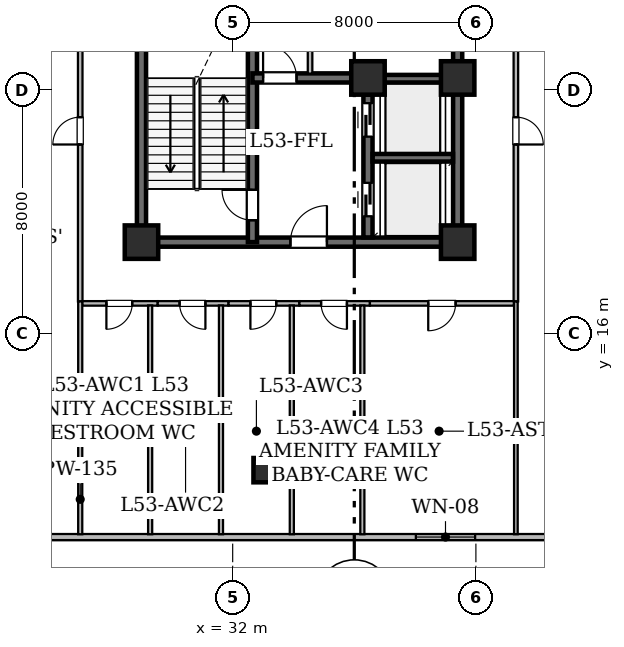
"""IFC4 building model, lengths in metres.
Left out: names, types, materials, properties, quantities, classifications, styles, units other than length and angle.
Written with IfcOpenShell. Run it as: python <this file> out.ifc"""

import sys

from ifc_helpers import new_model, si_unit, direction, frame, frame_2d, origin, origin_2d, place, context, subcontext, project, spatial, rectangle, hollow_rectangle, extrude, element, fill, save


model = new_model("IFC4")
c1 = context("Model", 3, precision=1e-05, world=origin(), true_north=direction((0.0, 1.0)))
c2 = subcontext(c1, "Body", "Model", "MODEL_VIEW")
j1 = project(units=[si_unit("LENGTHUNIT", "METRE"), si_unit("PLANEANGLEUNIT", "RADIAN")], contexts=[c1])
p1 = place(None, origin())
s1 = spatial("IfcSite", under=j1, at=p1, CompositionType="ELEMENT")
p2 = place(p1, origin())
s2 = spatial("IfcBuilding", under=s1, at=p2, CompositionType="ELEMENT")
p3 = place(p2, frame((0.0, 0.0, 207.0)))
s3 = spatial("IfcBuildingStorey", under=s2, at=p3, CompositionType="ELEMENT", Elevation=207.0)
for number, where, z_axis, x_axis in (
    (1, (29.0, 19.0, 0.0), (0.0, 0.0, 1.0), (1.0, 0.0, 0.0)),
    (2, (39.4, 19.0, 0.0), (0.0, 0.0, 1.0), (1.0, 0.0, 0.0)),
    (3, (36.45, 24.4, 0.0), (0.0, 0.0, 1.0), (1.0, 0.0, 0.0)),
    (4, (39.4, 24.4, 0.0), (0.0, 0.0, 1.0), (1.0, 0.0, 0.0)),
):
    element("IfcColumn", number, at=place(p3, frame(where, z_axis=z_axis, x_axis=x_axis)), inside=s3, PredefinedType="COLUMN", context=c2, shape_type="SweptSolid", body=[
        extrude(hollow_rectangle(XDim=1.1, YDim=1.1, WallThickness=0.055, at=origin_2d()), origin(), (0.0, 0.0, 1.0), 4.8),
    ])
p4 = place(p3, frame((33.083, 11.5, 0.0), z_axis=(0.0, 0.0, 1.0), x_axis=(1.0, 0.0, 0.0)))
e5 = element("IfcColumn", 5, at=p4, inside=s3, PredefinedType="COLUMN", context=c2, shape_type="SweptSolid", body=[
    extrude(hollow_rectangle(XDim=0.8, YDim=0.8, WallThickness=0.04, at=origin_2d()), origin(), (0.0, 0.0, 1.0), 4.8),
])
p5 = place(p3, frame((58.896, 9.3, 0.0), z_axis=(0.0, 0.0, 1.0), x_axis=(-1.0, 0.0, 0.0)))
e6 = element("IfcWall", 6, at=p5, inside=s3, PredefinedType="STANDARD", context=c2, shape_type="SweptSolid", body=[
    extrude(rectangle(XDim=39.793, YDim=0.2, at=frame_2d((19.896, 0.0))), origin(), (0.0, 0.0, 1.0), 4.48),
])
p6 = place(p5, frame((18.921, 0.0, 0.9)))
e7 = element("IfcOpeningElement", 7, at=p6, cuts=e6, PredefinedType="OPENING", context=c2, shape_type="SweptSolid", body=[
    extrude(rectangle(XDim=1.95, YDim=1.65, at=frame_2d((0.975, 0.825))), frame((0.0, 0.11, 0.0), z_axis=(0.0, -1.0, 0.0), x_axis=(1.0, 0.0, 0.0)), (0.0, 0.0, 1.0), 0.22),
])
p7 = place(p3, frame((29.0, 19.0, 0.0), z_axis=(0.0, 0.0, 1.0), x_axis=(0.0, 1.0, 0.0)))
e8 = element("IfcWall", 8, at=p7, inside=s3, PredefinedType="SHEAR", context=c2, shape_type="SweptSolid", body=[
    extrude(rectangle(XDim=9.0, YDim=0.3, at=frame_2d((4.5, 0.0))), origin(), (0.0, 0.0, 1.0), 4.48),
])
p8 = place(p3, frame((29.0, 19.0, 0.0), z_axis=(0.0, 0.0, 1.0), x_axis=(1.0, 0.0, 0.0)))
e9 = element("IfcWall", 9, at=p8, inside=s3, PredefinedType="SHEAR", context=c2, shape_type="SweptSolid", body=[
    extrude(rectangle(XDim=10.4, YDim=0.3, at=frame_2d((5.2, 0.0))), origin(), (0.0, 0.0, 1.0), 4.48),
])
p9 = place(p8, frame((4.9, 0.0, 0.0)))
e10 = element("IfcOpeningElement", 10, at=p9, cuts=e9, PredefinedType="OPENING", context=c2, shape_type="SweptSolid", body=[
    extrude(rectangle(XDim=1.2, YDim=2.15, at=frame_2d((0.6, 1.075))), frame((0.0, 0.16, 0.0), z_axis=(0.0, -1.0, 0.0), x_axis=(1.0, 0.0, 0.0)), (0.0, 0.0, 1.0), 0.32),
])
p10 = place(p3, frame((39.4, 19.0, 0.0), z_axis=(0.0, 0.0, 1.0), x_axis=(0.0, 1.0, 0.0)))
e11 = element("IfcWall", 11, at=p10, inside=s3, PredefinedType="SHEAR", context=c2, shape_type="SweptSolid", body=[
    extrude(rectangle(XDim=5.4, YDim=0.3, at=frame_2d((2.7, 0.0))), origin(), (0.0, 0.0, 1.0), 4.48),
])
p11 = place(p3, frame((39.4, 24.4, 0.0), z_axis=(0.0, 0.0, 1.0), x_axis=(0.0, 1.0, 0.0)))
e12 = element("IfcWall", 12, at=p11, inside=s3, PredefinedType="SHEAR", context=c2, shape_type="SweptSolid", body=[
    extrude(rectangle(XDim=12.6, YDim=0.3, at=frame_2d((6.3, 0.0))), origin(), (0.0, 0.0, 1.0), 4.48),
])
p12 = place(p3, frame((32.65, 19.0, 0.0), z_axis=(0.0, 0.0, 1.0), x_axis=(0.0, 1.0, 0.0)))
e13 = element("IfcWall", 13, at=p12, inside=s3, PredefinedType="SHEAR", context=c2, shape_type="SweptSolid", body=[
    extrude(rectangle(XDim=9.0, YDim=0.3, at=frame_2d((4.5, 0.0))), origin(), (0.0, 0.0, 1.0), 4.48),
])
p13 = place(p12, frame((0.72, 0.0, 0.0)))
e14 = element("IfcOpeningElement", 14, at=p13, cuts=e13, PredefinedType="OPENING", context=c2, shape_type="SweptSolid", body=[
    extrude(rectangle(XDim=1.0, YDim=2.15, at=frame_2d((0.5, 1.075))), frame((0.0, 0.16, 0.0), z_axis=(0.0, -1.0, 0.0), x_axis=(1.0, 0.0, 0.0)), (0.0, 0.0, 1.0), 0.32),
])
p14 = place(p3, frame((32.65, 24.4, 0.0), z_axis=(0.0, 0.0, 1.0), x_axis=(1.0, 0.0, 0.0)))
e15 = element("IfcWall", 15, at=p14, inside=s3, PredefinedType="SHEAR", context=c2, shape_type="SweptSolid", body=[
    extrude(rectangle(XDim=3.8, YDim=0.3, at=frame_2d((1.9, 0.0))), origin(), (0.0, 0.0, 1.0), 4.48),
])
p15 = place(p14, frame((0.35, 0.0, 0.0)))
e16 = element("IfcOpeningElement", 16, at=p15, cuts=e15, PredefinedType="OPENING", context=c2, shape_type="SweptSolid", body=[
    extrude(rectangle(XDim=1.1, YDim=2.15, at=frame_2d((0.55, 1.075))), frame((0.0, 0.16, 0.0), z_axis=(0.0, -1.0, 0.0), x_axis=(1.0, 0.0, 0.0)), (0.0, 0.0, 1.0), 0.32),
])
p16 = place(p3, frame((36.45, 19.154, 0.0), z_axis=(0.0, 0.0, 1.0), x_axis=(0.0, 1.0, 0.0)))
e17 = element("IfcWall", 17, at=p16, inside=s3, PredefinedType="SHEAR", context=c2, shape_type="SweptSolid", body=[
    extrude(rectangle(XDim=4.696, YDim=0.3, at=frame_2d((2.348, 0.0))), origin(), (0.0, 0.0, 1.0), 4.48),
])
p17 = place(p16, frame((0.696, 0.0, 0.0)))
e18 = element("IfcOpeningElement", 18, at=p17, cuts=e17, PredefinedType="OPENING", context=c2, shape_type="SweptSolid", body=[
    extrude(rectangle(XDim=1.1, YDim=2.15, at=frame_2d((0.55, 1.075))), frame((0.0, 0.16, 0.0), z_axis=(0.0, -1.0, 0.0), x_axis=(1.0, 0.0, 0.0)), (0.0, 0.0, 1.0), 0.32),
])
p18 = place(p16, frame((3.316, 0.0, 0.0)))
e19 = element("IfcOpeningElement", 19, at=p18, cuts=e17, PredefinedType="OPENING", context=c2, shape_type="SweptSolid", body=[
    extrude(rectangle(XDim=1.1, YDim=2.15, at=frame_2d((0.55, 1.075))), frame((0.0, 0.16, 0.0), z_axis=(0.0, -1.0, 0.0), x_axis=(1.0, 0.0, 0.0)), (0.0, 0.0, 1.0), 0.32),
])
for number, where, z_axis, x_axis in (
    (20, (36.604, 21.775, 0.0), (0.0, 0.0, 1.0), (1.0, 0.0, 0.0)),
    (21, (36.604, 24.375, 0.0), (0.0, 0.0, 1.0), (1.0, 0.0, 0.0)),
):
    element("IfcWall", number, at=place(p3, frame(where, z_axis=z_axis, x_axis=x_axis)), inside=s3, PredefinedType="SHEAR", context=c2, shape_type="SweptSolid", body=[
        extrude(rectangle(XDim=2.642, YDim=0.25, at=frame_2d((1.321, 0.0))), origin(), (0.0, 0.0, 1.0), 4.48),
    ])
p19 = place(p3, frame((34.545, 28.136, 0.0), z_axis=(0.0, 0.0, 1.0), x_axis=(0.0, -1.0, 0.0)))
e22 = element("IfcWall", 22, at=p19, inside=s3, PredefinedType="STANDARD", context=c2, shape_type="SweptSolid", body=[
    extrude(rectangle(XDim=3.592, YDim=0.15, at=frame_2d((1.796, 0.0))), origin(), (0.0, 0.0, 1.0), 4.48),
])
p20 = place(p19, frame((1.346, 0.0, 0.0)))
e23 = element("IfcOpeningElement", 23, at=p20, cuts=e22, PredefinedType="OPENING", context=c2, shape_type="SweptSolid", body=[
    extrude(rectangle(XDim=0.9, YDim=2.1, at=frame_2d((0.45, 1.05))), frame((0.0, 0.085, 0.0), z_axis=(0.0, -1.0, 0.0), x_axis=(1.0, 0.0, 0.0)), (0.0, 0.0, 1.0), 0.17),
])
p21 = place(p3, frame((41.315, 28.314, 0.0), z_axis=(0.0, 0.0, 1.0), x_axis=(0.0, -1.0, 0.0)))
e24 = element("IfcWall", 24, at=p21, inside=s3, PredefinedType="STANDARD", context=c2, shape_type="SweptSolid", body=[
    extrude(rectangle(XDim=11.264, YDim=0.15, at=frame_2d((5.632, 0.0))), origin(), (0.0, 0.0, 1.0), 3.775),
])
p22 = place(p21, frame((5.203, 0.0, 0.0)))
e25 = element("IfcOpeningElement", 25, at=p22, cuts=e24, PredefinedType="OPENING", context=c2, shape_type="SweptSolid", body=[
    extrude(rectangle(XDim=0.9, YDim=2.1, at=frame_2d((0.45, 1.05))), frame((0.0, 0.085, 0.0), z_axis=(0.0, -1.0, 0.0), x_axis=(1.0, 0.0, 0.0)), (0.0, 0.0, 1.0), 0.17),
])
p23 = place(p3, frame((26.985, 17.05, 0.0), z_axis=(0.0, 0.0, 1.0), x_axis=(0.0, 1.0, 0.0)))
e26 = element("IfcWall", 26, at=p23, inside=s3, PredefinedType="STANDARD", context=c2, shape_type="SweptSolid", body=[
    extrude(rectangle(XDim=11.264, YDim=0.15, at=frame_2d((5.632, 0.0))), origin(), (0.0, 0.0, 1.0), 3.775),
])
p24 = place(p23, frame((5.161, 0.0, 0.0)))
e27 = element("IfcOpeningElement", 27, at=p24, cuts=e26, PredefinedType="OPENING", context=c2, shape_type="SweptSolid", body=[
    extrude(rectangle(XDim=0.9, YDim=2.1, at=frame_2d((0.45, 1.05))), frame((0.0, 0.085, 0.0), z_axis=(0.0, -1.0, 0.0), x_axis=(1.0, 0.0, 0.0)), (0.0, 0.0, 1.0), 0.17),
])
p25 = place(p3, frame((29.534, 16.985, 0.0), z_axis=(0.0, 0.0, 1.0), x_axis=(-1.0, 0.0, 0.0)))
e28 = element("IfcWall", 28, at=p25, inside=s3, PredefinedType="STANDARD", context=c2, shape_type="SweptSolid", body=[
    extrude(rectangle(XDim=2.484, YDim=0.15, at=frame_2d((1.242, 0.0))), origin(), (0.0, 0.0, 1.0), 3.775),
])
p26 = place(p25, frame((0.838, 0.0, 0.0)))
e29 = element("IfcOpeningElement", 29, at=p26, cuts=e28, PredefinedType="OPENING", context=c2, shape_type="SweptSolid", body=[
    extrude(rectangle(XDim=0.85, YDim=2.1, at=frame_2d((0.425, 1.05))), frame((0.0, 0.085, 0.0), z_axis=(0.0, -1.0, 0.0), x_axis=(1.0, 0.0, 0.0)), (0.0, 0.0, 1.0), 0.17),
])
p27 = place(p3, frame((31.864, 16.985, 0.0), z_axis=(0.0, 0.0, 1.0), x_axis=(-1.0, 0.0, 0.0)))
e30 = element("IfcWall", 30, at=p27, inside=s3, PredefinedType="STANDARD", context=c2, shape_type="SweptSolid", body=[
    extrude(rectangle(XDim=2.33, YDim=0.15, at=frame_2d((1.165, 0.0))), origin(), (0.0, 0.0, 1.0), 3.775),
])
p28 = place(p27, frame((0.761, 0.0, 0.0)))
e31 = element("IfcOpeningElement", 31, at=p28, cuts=e30, PredefinedType="OPENING", context=c2, shape_type="SweptSolid", body=[
    extrude(rectangle(XDim=0.85, YDim=2.1, at=frame_2d((0.425, 1.05))), frame((0.0, 0.085, 0.0), z_axis=(0.0, -1.0, 0.0), x_axis=(1.0, 0.0, 0.0)), (0.0, 0.0, 1.0), 0.17),
])
p29 = place(p3, frame((34.194, 16.985, 0.0), z_axis=(0.0, 0.0, 1.0), x_axis=(-1.0, 0.0, 0.0)))
e32 = element("IfcWall", 32, at=p29, inside=s3, PredefinedType="STANDARD", context=c2, shape_type="SweptSolid", body=[
    extrude(rectangle(XDim=2.33, YDim=0.15, at=frame_2d((1.165, 0.0))), origin(), (0.0, 0.0, 1.0), 4.48),
])
p30 = place(p29, frame((0.761, 0.0, 0.0)))
e33 = element("IfcOpeningElement", 33, at=p30, cuts=e32, PredefinedType="OPENING", context=c2, shape_type="SweptSolid", body=[
    extrude(rectangle(XDim=0.85, YDim=2.1, at=frame_2d((0.425, 1.05))), frame((0.0, 0.085, 0.0), z_axis=(0.0, -1.0, 0.0), x_axis=(1.0, 0.0, 0.0)), (0.0, 0.0, 1.0), 0.17),
])
p31 = place(p3, frame((36.514, 16.985, 0.0), z_axis=(0.0, 0.0, 1.0), x_axis=(-1.0, 0.0, 0.0)))
e34 = element("IfcWall", 34, at=p31, inside=s3, PredefinedType="STANDARD", context=c2, shape_type="SweptSolid", body=[
    extrude(rectangle(XDim=2.32, YDim=0.15, at=frame_2d((1.16, 0.0))), origin(), (0.0, 0.0, 1.0), 4.48),
])
p32 = place(p31, frame((0.756, 0.0, 0.0)))
e35 = element("IfcOpeningElement", 35, at=p32, cuts=e34, PredefinedType="OPENING", context=c2, shape_type="SweptSolid", body=[
    extrude(rectangle(XDim=0.85, YDim=2.1, at=frame_2d((0.425, 1.05))), frame((0.0, 0.085, 0.0), z_axis=(0.0, -1.0, 0.0), x_axis=(1.0, 0.0, 0.0)), (0.0, 0.0, 1.0), 0.17),
])
p33 = place(p3, frame((41.25, 16.985, 0.0), z_axis=(0.0, 0.0, 1.0), x_axis=(-1.0, 0.0, 0.0)))
e36 = element("IfcWall", 36, at=p33, inside=s3, PredefinedType="STANDARD", context=c2, shape_type="SweptSolid", body=[
    extrude(rectangle(XDim=4.736, YDim=0.15, at=frame_2d((2.368, 0.0))), origin(), (0.0, 0.0, 1.0), 3.775),
])
p34 = place(p33, frame((1.918, 0.0, 0.0)))
e37 = element("IfcOpeningElement", 37, at=p34, cuts=e36, PredefinedType="OPENING", context=c2, shape_type="SweptSolid", body=[
    extrude(rectangle(XDim=0.9, YDim=2.1, at=frame_2d((0.45, 1.05))), frame((0.0, 0.085, 0.0), z_axis=(0.0, -1.0, 0.0), x_axis=(1.0, 0.0, 0.0)), (0.0, 0.0, 1.0), 0.17),
])
p35 = place(p3, frame((41.315, 9.392, 0.0), z_axis=(0.0, 0.0, 1.0), x_axis=(0.0, 1.0, 0.0)))
e38 = element("IfcWall", 38, at=p35, inside=s3, PredefinedType="PARTITIONING", context=c2, shape_type="SweptSolid", body=[
    extrude(rectangle(XDim=7.658, YDim=0.12, at=frame_2d((3.829, 0.0))), origin(), (0.0, 0.0, 1.0), 3.775),
])
p36 = place(p3, frame((26.985, 17.05, 0.0), z_axis=(0.0, 0.0, 1.0), x_axis=(0.0, -1.0, 0.0)))
e39 = element("IfcWall", 39, at=p36, inside=s3, PredefinedType="PARTITIONING", context=c2, shape_type="SweptSolid", body=[
    extrude(rectangle(XDim=7.658, YDim=0.135, at=frame_2d((3.829, 0.0))), origin(), (0.0, 0.0, 1.0), 3.775),
])
p37 = place(p3, frame((29.285, 16.918, 0.0), z_axis=(0.0, 0.0, 1.0), x_axis=(0.0, -1.0, 0.0)))
e40 = element("IfcWall", 40, at=p37, inside=s3, PredefinedType="PARTITIONING", context=c2, shape_type="SweptSolid", body=[
    extrude(rectangle(XDim=7.526, YDim=0.135, at=frame_2d((3.763, 0.0))), origin(), (0.0, 0.0, 1.0), 3.937),
])
p38 = place(p3, frame((31.615, 16.918, 0.0), z_axis=(0.0, 0.0, 1.0), x_axis=(0.0, -1.0, 0.0)))
e41 = element("IfcWall", 41, at=p38, inside=s3, PredefinedType="PARTITIONING", context=c2, shape_type="SweptSolid", body=[
    extrude(rectangle(XDim=7.526, YDim=0.135, at=frame_2d((3.763, 0.0))), origin(), (0.0, 0.0, 1.0), 3.775),
])
for number, where, z_axis, x_axis in (
    (42, (33.945, 16.918, 0.0), (0.0, 0.0, 1.0), (0.0, -1.0, 0.0)),
    (43, (36.265, 16.918, 0.0), (0.0, 0.0, 1.0), (0.0, -1.0, 0.0)),
):
    element("IfcWall", number, at=place(p3, frame(where, z_axis=z_axis, x_axis=x_axis)), inside=s3, PredefinedType="PARTITIONING", context=c2, shape_type="SweptSolid", body=[
        extrude(rectangle(XDim=7.526, YDim=0.135, at=frame_2d((3.763, 0.0))), origin(), (0.0, 0.0, 1.0), 3.937),
    ])
p39 = place(p6, origin())
e44 = element("IfcWindow", 44, at=p39, inside=s3, PartitioningType="SINGLE_PANEL", PredefinedType="WINDOW", context=c2, shape_type="SweptSolid", body=[
    extrude(rectangle(XDim=1.95, YDim=1.65, at=frame_2d((0.975, 0.825))), frame((0.0, 0.03, 0.0), z_axis=(0.0, -1.0, 0.0), x_axis=(1.0, 0.0, 0.0)), (0.0, 0.0, 1.0), 0.06),
])
fill(e7, e44)
p40 = place(p13, origin())
e45 = element("IfcDoor", 45, at=p40, inside=s3, OperationType="SINGLE_SWING_RIGHT", PredefinedType="DOOR", context=c2, shape_type="SweptSolid", body=[
    extrude(rectangle(XDim=1.0, YDim=2.15, at=frame_2d((0.5, 1.075))), frame((0.0, 0.025, 0.0), z_axis=(0.0, -1.0, 0.0), x_axis=(1.0, 0.0, 0.0)), (0.0, 0.0, 1.0), 0.05),
])
fill(e14, e45)
p41 = place(p15, origin())
e46 = element("IfcDoor", 46, at=p41, inside=s3, OperationType="SINGLE_SWING_LEFT", PredefinedType="DOOR", context=c2, shape_type="SweptSolid", body=[
    extrude(rectangle(XDim=1.1, YDim=2.15, at=frame_2d((0.55, 1.075))), frame((0.0, 0.025, 0.0), z_axis=(0.0, -1.0, 0.0), x_axis=(1.0, 0.0, 0.0)), (0.0, 0.0, 1.0), 0.05),
])
fill(e16, e46)
p42 = place(p9, origin())
e47 = element("IfcDoor", 47, at=p42, inside=s3, OperationType="SINGLE_SWING_RIGHT", PredefinedType="DOOR", context=c2, shape_type="SweptSolid", body=[
    extrude(rectangle(XDim=1.2, YDim=2.15, at=frame_2d((0.6, 1.075))), frame((0.0, 0.025, 0.0), z_axis=(0.0, -1.0, 0.0), x_axis=(1.0, 0.0, 0.0)), (0.0, 0.0, 1.0), 0.05),
])
fill(e10, e47)
p43 = place(p17, origin())
e48 = element("IfcDoor", 48, at=p43, inside=s3, OperationType="SLIDING_TO_LEFT", PredefinedType="DOOR", context=c2, shape_type="SweptSolid", body=[
    extrude(rectangle(XDim=1.1, YDim=2.15, at=frame_2d((0.55, 1.075))), frame((0.0, 0.025, 0.0), z_axis=(0.0, -1.0, 0.0), x_axis=(1.0, 0.0, 0.0)), (0.0, 0.0, 1.0), 0.05),
])
fill(e18, e48)
p44 = place(p18, origin())
e49 = element("IfcDoor", 49, at=p44, inside=s3, OperationType="SLIDING_TO_LEFT", PredefinedType="DOOR", context=c2, shape_type="SweptSolid", body=[
    extrude(rectangle(XDim=1.1, YDim=2.15, at=frame_2d((0.55, 1.075))), frame((0.0, 0.025, 0.0), z_axis=(0.0, -1.0, 0.0), x_axis=(1.0, 0.0, 0.0)), (0.0, 0.0, 1.0), 0.05),
])
fill(e19, e49)
p45 = place(p22, origin())
e50 = element("IfcDoor", 50, at=p45, inside=s3, OperationType="SINGLE_SWING_RIGHT", PredefinedType="DOOR", context=c2, shape_type="SweptSolid", body=[
    extrude(rectangle(XDim=0.9, YDim=2.1, at=frame_2d((0.45, 1.05))), frame((0.0, 0.025, 0.0), z_axis=(0.0, -1.0, 0.0), x_axis=(1.0, 0.0, 0.0)), (0.0, 0.0, 1.0), 0.05),
])
fill(e25, e50)
p46 = place(p24, origin())
e51 = element("IfcDoor", 51, at=p46, inside=s3, OperationType="SINGLE_SWING_LEFT", PredefinedType="DOOR", context=c2, shape_type="SweptSolid", body=[
    extrude(rectangle(XDim=0.9, YDim=2.1, at=frame_2d((0.45, 1.05))), frame((0.0, 0.025, 0.0), z_axis=(0.0, -1.0, 0.0), x_axis=(1.0, 0.0, 0.0)), (0.0, 0.0, 1.0), 0.05),
])
fill(e27, e51)
p47 = place(p26, origin())
e52 = element("IfcDoor", 52, at=p47, inside=s3, OperationType="SINGLE_SWING_RIGHT", PredefinedType="DOOR", context=c2, shape_type="SweptSolid", body=[
    extrude(rectangle(XDim=0.85, YDim=2.1, at=frame_2d((0.425, 1.05))), frame((0.0, 0.025, 0.0), z_axis=(0.0, -1.0, 0.0), x_axis=(1.0, 0.0, 0.0)), (0.0, 0.0, 1.0), 0.05),
])
fill(e29, e52)
p48 = place(p28, origin())
e53 = element("IfcDoor", 53, at=p48, inside=s3, OperationType="SINGLE_SWING_LEFT", PredefinedType="DOOR", context=c2, shape_type="SweptSolid", body=[
    extrude(rectangle(XDim=0.85, YDim=2.1, at=frame_2d((0.425, 1.05))), frame((0.0, 0.025, 0.0), z_axis=(0.0, -1.0, 0.0), x_axis=(1.0, 0.0, 0.0)), (0.0, 0.0, 1.0), 0.05),
])
fill(e31, e53)
p49 = place(p30, origin())
e54 = element("IfcDoor", 54, at=p49, inside=s3, OperationType="SINGLE_SWING_RIGHT", PredefinedType="DOOR", context=c2, shape_type="SweptSolid", body=[
    extrude(rectangle(XDim=0.85, YDim=2.1, at=frame_2d((0.425, 1.05))), frame((0.0, 0.025, 0.0), z_axis=(0.0, -1.0, 0.0), x_axis=(1.0, 0.0, 0.0)), (0.0, 0.0, 1.0), 0.05),
])
fill(e33, e54)
p50 = place(p32, origin())
e55 = element("IfcDoor", 55, at=p50, inside=s3, OperationType="SINGLE_SWING_LEFT", PredefinedType="DOOR", context=c2, shape_type="SweptSolid", body=[
    extrude(rectangle(XDim=0.85, YDim=2.1, at=frame_2d((0.425, 1.05))), frame((0.0, 0.025, 0.0), z_axis=(0.0, -1.0, 0.0), x_axis=(1.0, 0.0, 0.0)), (0.0, 0.0, 1.0), 0.05),
])
fill(e35, e55)
p51 = place(p34, origin())
e56 = element("IfcDoor", 56, at=p51, inside=s3, OperationType="SINGLE_SWING_RIGHT", PredefinedType="DOOR", context=c2, shape_type="SweptSolid", body=[
    extrude(rectangle(XDim=0.9, YDim=2.1, at=frame_2d((0.45, 1.05))), frame((0.0, 0.025, 0.0), z_axis=(0.0, -1.0, 0.0), x_axis=(1.0, 0.0, 0.0)), (0.0, 0.0, 1.0), 0.05),
])
fill(e37, e56)
save(model, sys.argv[1])
